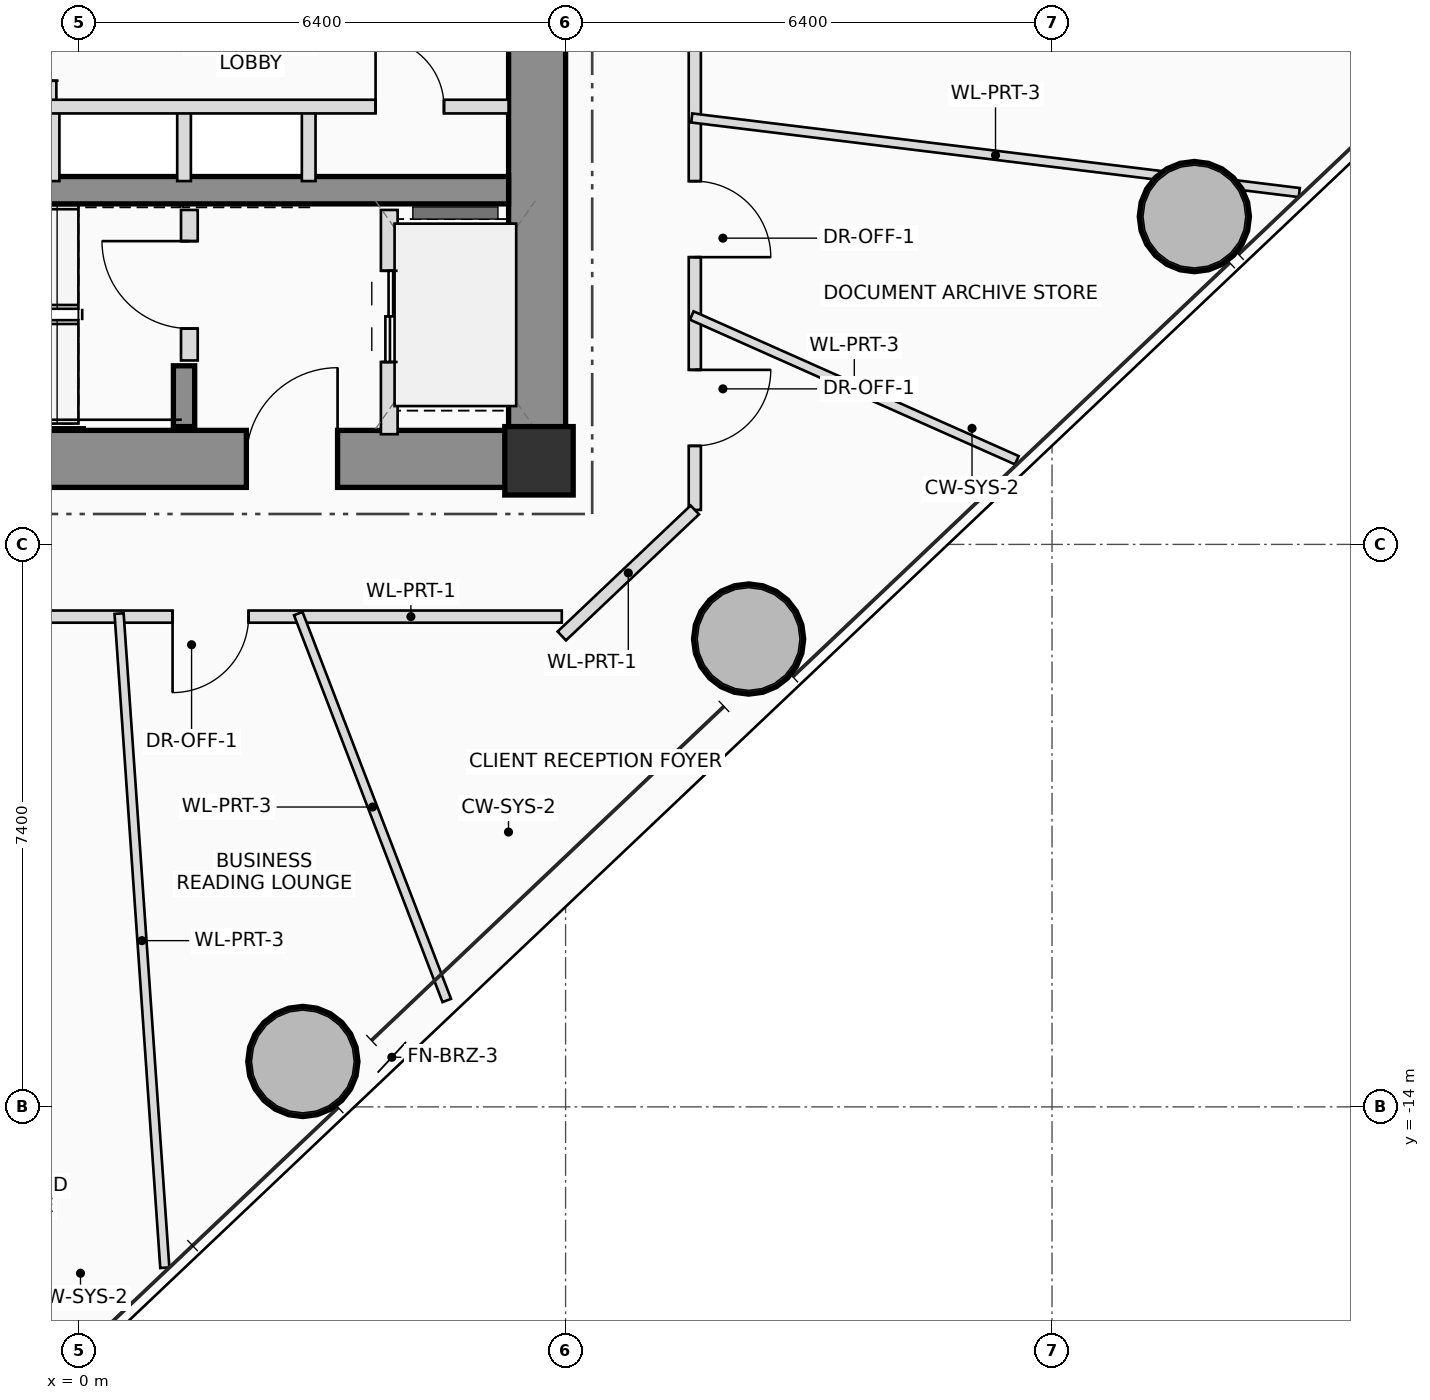
"""IFC4 building model, lengths in metres.
Left out: names, types, materials, properties, quantities, classifications, styles, units other than length and angle.
Written with IfcOpenShell. Run it as: python <this file> out.ifc"""

import sys

from ifc_helpers import new_model, si_unit, direction, frame, frame_2d, origin, origin_2d, place, context, subcontext, project, spatial, rectangle, hollow_circle, extrude, source, transform, mapped, element, fill, save


model = new_model("IFC4")
c1 = context("Model", 3, precision=1e-05, world=origin(), true_north=direction((0.0, 1.0)))
c2 = subcontext(c1, "Body", "Model", "MODEL_VIEW")
j1 = project(units=[si_unit("LENGTHUNIT", "METRE"), si_unit("PLANEANGLEUNIT", "RADIAN")], contexts=[c1])
p1 = place(None, origin())
s1 = spatial("IfcSite", under=j1, at=p1, CompositionType="ELEMENT")
p2 = place(p1, origin())
s2 = spatial("IfcBuilding", under=s1, at=p2, CompositionType="ELEMENT")
p3 = place(p2, frame((0.0, 0.0, 101.15)))
s3 = spatial("IfcBuildingStorey", under=s2, at=p3, CompositionType="ELEMENT", Elevation=101.15)
m1 = source(origin(), c2, "Body", "SweptSolid", [
    extrude(rectangle(XDim=0.9, YDim=0.9, at=origin_2d()), origin(), (0.0, 0.0, 1.0), 3.75),
])
p4 = place(p3, frame((6.05, -5.5, 0.0), z_axis=(0.0, 0.0, 1.0), x_axis=(1.0, 0.0, 0.0)))
e1 = element("IfcColumn", 1, at=p4, inside=s3, PredefinedType="COLUMN", context=c2, shape_type="MappedRepresentation", body=[
    mapped(m1, transform((0.0, 0.0, 0.0), scale=1.0)),
])
p5 = place(p3, frame((-6.4, -5.475, 0.0), z_axis=(0.0, 0.0, 1.0), x_axis=(1.0, 0.0, 0.0)))
e2 = element("IfcWall", 2, at=p5, inside=s3, PredefinedType="SHEAR", context=c2, shape_type="SweptSolid", body=[
    extrude(rectangle(XDim=12.8, YDim=0.75, at=frame_2d((6.4, 0.0))), origin(), (0.0, 0.0, 1.0), 3.75),
])
p6 = place(p5, frame((8.6, 0.0, 0.0)))
e3 = element("IfcOpeningElement", 3, at=p6, cuts=e2, PredefinedType="OPENING", context=c2, shape_type="SweptSolid", body=[
    extrude(rectangle(XDim=1.2, YDim=2.2, at=frame_2d((0.6, 1.1))), frame((0.0, 0.385, 0.0), z_axis=(0.0, -1.0, 0.0), x_axis=(1.0, 0.0, 0.0)), (0.0, 0.0, 1.0), 0.77),
])
p7 = place(p3, frame((6.025, -5.1, 0.0), z_axis=(0.0, 0.0, 1.0), x_axis=(0.0, 1.0, 0.0)))
e4 = element("IfcWall", 4, at=p7, inside=s3, PredefinedType="SHEAR", context=c2, shape_type="SweptSolid", body=[
    extrude(rectangle(XDim=10.2, YDim=0.75, at=frame_2d((5.1, 0.0))), origin(), (0.0, 0.0, 1.0), 3.75),
])
p8 = place(p3, frame((-5.65, -1.94, 0.0), z_axis=(0.0, 0.0, 1.0), x_axis=(1.0, 0.0, 0.0)))
e5 = element("IfcWall", 5, at=p8, inside=s3, PredefinedType="SHEAR", context=c2, shape_type="SweptSolid", body=[
    extrude(rectangle(XDim=11.3, YDim=0.36, at=frame_2d((5.65, 0.0))), origin(), (0.0, 0.0, 1.0), 3.75),
])
p9 = place(p3, frame((1.38, -5.05, 0.0), z_axis=(0.0, 0.0, 1.0), x_axis=(0.0, 1.0, 0.0)))
e6 = element("IfcWall", 6, at=p9, inside=s3, PredefinedType="SHEAR", context=c2, shape_type="SweptSolid", body=[
    extrude(rectangle(XDim=0.8, YDim=0.28, at=frame_2d((0.4, 0.0))), origin(), (0.0, 0.0, 1.0), 3.75),
])
m2 = source(origin(), c2, "Body", "SweptSolid", [
    extrude(hollow_circle(Radius=0.725, WallThickness=0.05, at=origin_2d()), origin(), (0.0, 0.0, 1.0), 3.75),
])
for number, where, z_axis, x_axis in (
    (7, (2.943, -13.402, 0.0), (0.0, 0.0, 1.0), (1.0, 0.0, 0.0)),
    (8, (8.808, -7.845, 0.0), (0.0, 0.0, 1.0), (1.0, 0.0, 0.0)),
    (9, (14.673, -2.287, 0.0), (0.0, 0.0, 1.0), (1.0, 0.0, 0.0)),
):
    element("IfcColumn", number, at=place(p3, frame(where, z_axis=z_axis, x_axis=x_axis)), inside=s3, PredefinedType="COLUMN", context=c2, shape_type="MappedRepresentation", body=[
        mapped(m2, transform((0.0, 0.0, 0.0), scale=1.0)),
    ])
p10 = place(p3, frame((1.45, -4.18, 0.0), z_axis=(0.0, 0.0, 1.0), x_axis=(0.0, 1.0, 0.0)))
e10 = element("IfcWall", 10, at=p10, inside=s3, PredefinedType="PLUMBINGWALL", context=c2, shape_type="SweptSolid", body=[
    extrude(rectangle(XDim=1.98, YDim=0.22, at=frame_2d((0.99, 0.0))), origin(), (0.0, 0.0, 1.0), 3.545),
])
p11 = place(p10, frame((0.42, 0.0, 0.0)))
e11 = element("IfcOpeningElement", 11, at=p11, cuts=e10, PredefinedType="OPENING", context=c2, shape_type="SweptSolid", body=[
    extrude(rectangle(XDim=1.15, YDim=2.15, at=frame_2d((0.575, 1.075))), frame((0.0, 0.12, 0.0), z_axis=(0.0, -1.0, 0.0), x_axis=(1.0, 0.0, 0.0)), (0.0, 0.0, 1.0), 0.24),
])
p12 = place(p3, frame((4.08, -5.15, 0.0), z_axis=(0.0, 0.0, 1.0), x_axis=(0.0, 1.0, 0.0)))
e12 = element("IfcWall", 12, at=p12, inside=s3, PredefinedType="PLUMBINGWALL", context=c2, shape_type="SweptSolid", body=[
    extrude(rectangle(XDim=2.95, YDim=0.22, at=frame_2d((1.475, 0.0))), origin(), (0.0, 0.0, 1.0), 3.545),
])
p13 = place(p12, frame((0.95, 0.0, 0.0)))
e13 = element("IfcOpeningElement", 13, at=p13, cuts=e12, PredefinedType="OPENING", context=c2, shape_type="SweptSolid", body=[
    extrude(rectangle(XDim=1.2, YDim=2.25, at=frame_2d((0.6, 1.125))), frame((0.0, 0.12, 0.0), z_axis=(0.0, -1.0, 0.0), x_axis=(1.0, 0.0, 0.0)), (0.0, 0.0, 1.0), 0.24),
])
p14 = place(p3, frame((-0.35, -0.84, 0.0), z_axis=(0.0, 0.0, 1.0), x_axis=(0.0, 1.0, 0.0)))
e14 = element("IfcWall", 14, at=p14, inside=s3, PredefinedType="PARTITIONING", context=c2, shape_type="SweptSolid", body=[
    extrude(rectangle(XDim=1.68, YDim=0.1, at=frame_2d((0.84, 0.0))), origin(), (0.0, 0.0, 1.0), 3.545),
])
p15 = place(p14, frame((0.34, 0.0, 0.0)))
e15 = element("IfcOpeningElement", 15, at=p15, cuts=e14, PredefinedType="OPENING", context=c2, shape_type="SweptSolid", body=[
    extrude(rectangle(XDim=1.0, YDim=2.25, at=frame_2d((0.5, 1.125))), frame((0.0, 0.06, 0.0), z_axis=(0.0, -1.0, 0.0), x_axis=(1.0, 0.0, 0.0)), (0.0, 0.0, 1.0), 0.12),
])
for number, where, z_axis, x_axis in (
    (16, (-0.35, -1.82, 0.0), (0.0, 0.0, 1.0), (0.0, 1.0, 0.0)),
    (17, (1.38, -1.82, 0.0), (0.0, 0.0, 1.0), (0.0, 1.0, 0.0)),
    (18, (3.02, -1.82, 0.0), (0.0, 0.0, 1.0), (0.0, 1.0, 0.0)),
):
    element("IfcWall", number, at=place(p3, frame(where, z_axis=z_axis, x_axis=x_axis)), inside=s3, PredefinedType="PLUMBINGWALL", context=c2, shape_type="SweptSolid", body=[
        extrude(rectangle(XDim=0.98, YDim=0.18, at=frame_2d((0.49, 0.0))), origin(), (0.0, 0.0, 1.0), 3.545),
    ])
p16 = place(p3, frame((-5.68, -0.84, 0.0), z_axis=(0.0, 0.0, 1.0), x_axis=(1.0, 0.0, 0.0)))
e19 = element("IfcWall", 19, at=p16, inside=s3, PredefinedType="PLUMBINGWALL", context=c2, shape_type="SweptSolid", body=[
    extrude(rectangle(XDim=11.33, YDim=0.18, at=frame_2d((5.665, 0.0))), origin(), (0.0, 0.0, 1.0), 3.545),
])
p17 = place(p16, frame((0.43, 0.0, 0.0)))
e20 = element("IfcOpeningElement", 20, at=p17, cuts=e19, PredefinedType="OPENING", context=c2, shape_type="SweptSolid", body=[
    extrude(rectangle(XDim=1.1, YDim=2.2, at=frame_2d((0.55, 1.1))), frame((0.0, 0.1, 0.0), z_axis=(0.0, -1.0, 0.0), x_axis=(1.0, 0.0, 0.0)), (0.0, 0.0, 1.0), 0.2),
])
p18 = place(p16, frame((2.13, 0.0, 0.0)))
e21 = element("IfcOpeningElement", 21, at=p18, cuts=e19, PredefinedType="OPENING", context=c2, shape_type="SweptSolid", body=[
    extrude(rectangle(XDim=1.1, YDim=2.2, at=frame_2d((0.55, 1.1))), frame((0.0, 0.1, 0.0), z_axis=(0.0, -1.0, 0.0), x_axis=(1.0, 0.0, 0.0)), (0.0, 0.0, 1.0), 0.2),
])
p19 = place(p16, frame((9.58, 0.0, 0.0)))
e22 = element("IfcOpeningElement", 22, at=p19, cuts=e19, PredefinedType="OPENING", context=c2, shape_type="SweptSolid", body=[
    extrude(rectangle(XDim=0.9, YDim=2.05, at=frame_2d((0.45, 1.025))), frame((0.0, 0.1, 0.0), z_axis=(0.0, -1.0, 0.0), x_axis=(1.0, 0.0, 0.0)), (0.0, 0.0, 1.0), 0.2),
])
p20 = place(p3, frame((8.1, -0.02, 0.0), z_axis=(0.0, 0.0, 1.0), x_axis=(0.0, -1.0, 0.0)))
e23 = element("IfcWall", 23, at=p20, inside=s3, PredefinedType="PARTITIONING", context=c2, shape_type="SweptSolid", body=[
    extrude(rectangle(XDim=6.126, YDim=0.16, at=frame_2d((3.063, 0.0))), origin(), (0.0, 0.0, 1.0), 2.85),
])
p21 = place(p20, frame((1.801, 0.0, 0.0)))
e24 = element("IfcOpeningElement", 24, at=p21, cuts=e23, PredefinedType="OPENING", context=c2, shape_type="SweptSolid", body=[
    extrude(rectangle(XDim=1.0, YDim=2.25, at=frame_2d((0.5, 1.125))), frame((0.0, 0.09, 0.0), z_axis=(0.0, -1.0, 0.0), x_axis=(1.0, 0.0, 0.0)), (0.0, 0.0, 1.0), 0.18),
])
p22 = place(p20, frame((4.284, 0.0, 0.0)))
e25 = element("IfcOpeningElement", 25, at=p22, cuts=e23, PredefinedType="OPENING", context=c2, shape_type="SweptSolid", body=[
    extrude(rectangle(XDim=1.0, YDim=2.25, at=frame_2d((0.5, 1.125))), frame((0.0, 0.09, 0.0), z_axis=(0.0, -1.0, 0.0), x_axis=(1.0, 0.0, 0.0)), (0.0, 0.0, 1.0), 0.18),
])
p23 = place(p3, frame((8.1, -6.146, 0.0), z_axis=(0.0, 0.0, 1.0), x_axis=(-0.725888815428, -0.687812058368, 0.0)))
e26 = element("IfcWall", 26, at=p23, inside=s3, PredefinedType="PARTITIONING", context=c2, shape_type="SweptSolid", body=[
    extrude(rectangle(XDim=2.411, YDim=0.16, at=frame_2d((1.206, 0.0))), origin(), (0.0, 0.0, 1.0), 2.85),
])
p24 = place(p3, frame((6.35, -7.55, 0.0), z_axis=(0.0, 0.0, 1.0), x_axis=(-1.0, 0.0, 0.0)))
e27 = element("IfcWall", 27, at=p24, inside=s3, PredefinedType="PARTITIONING", context=c2, shape_type="SweptSolid", body=[
    extrude(rectangle(XDim=12.7, YDim=0.16, at=frame_2d((6.35, 0.0))), origin(), (0.0, 0.0, 1.0), 2.85),
])
p25 = place(p24, frame((4.121, 0.0, 0.0)))
e28 = element("IfcOpeningElement", 28, at=p25, cuts=e27, PredefinedType="OPENING", context=c2, shape_type="SweptSolid", body=[
    extrude(rectangle(XDim=1.0, YDim=2.25, at=frame_2d((0.5, 1.125))), frame((0.0, 0.09, 0.0), z_axis=(0.0, -1.0, 0.0), x_axis=(1.0, 0.0, 0.0)), (0.0, 0.0, 1.0), 0.18),
])
p26 = place(p24, frame((7.966, 0.0, 0.0)))
e29 = element("IfcOpeningElement", 29, at=p26, cuts=e27, PredefinedType="OPENING", context=c2, shape_type="SweptSolid", body=[
    extrude(rectangle(XDim=1.0, YDim=2.25, at=frame_2d((0.5, 1.125))), frame((0.0, 0.09, 0.0), z_axis=(0.0, -1.0, 0.0), x_axis=(1.0, 0.0, 0.0)), (0.0, 0.0, 1.0), 0.18),
])
p27 = place(p3, frame((0.525, -7.51, 0.0), z_axis=(0.0, 0.0, 1.0), x_axis=(0.069760692691, -0.997563755233, 0.0)))
e30 = element("IfcWall", 30, at=p27, inside=s3, PredefinedType="PARTITIONING", context=c2, shape_type="SweptSolid", body=[
    extrude(rectangle(XDim=8.627, YDim=0.12, at=frame_2d((4.313, 0.0))), origin(), (0.0, 0.0, 1.0), 3.01),
])
p28 = place(p3, frame((2.883, -7.51, 0.0), z_axis=(0.0, 0.0, 1.0), x_axis=(0.35836087515, -0.933583142072, 0.0)))
e31 = element("IfcWall", 31, at=p28, inside=s3, PredefinedType="PARTITIONING", context=c2, shape_type="SweptSolid", body=[
    extrude(rectangle(XDim=5.452, YDim=0.12, at=frame_2d((2.726, 0.0))), origin(), (0.0, 0.0, 1.0), 2.85),
])
p29 = place(p3, frame((8.06, -3.588, 0.0), z_axis=(0.0, 0.0, 1.0), x_axis=(0.913536081089, -0.406757702506, 0.0)))
e32 = element("IfcWall", 32, at=p29, inside=s3, PredefinedType="PARTITIONING", context=c2, shape_type="SweptSolid", body=[
    extrude(rectangle(XDim=4.682, YDim=0.12, at=frame_2d((2.341, 0.0))), origin(), (0.0, 0.0, 1.0), 2.85),
])
p30 = place(p3, frame((8.06, -0.99, 0.0), z_axis=(0.0, 0.0, 1.0), x_axis=(0.99254191086, -0.121903876831, 0.0)))
e33 = element("IfcWall", 33, at=p30, inside=s3, PredefinedType="PARTITIONING", context=c2, shape_type="SweptSolid", body=[
    extrude(rectangle(XDim=8.053, YDim=0.12, at=frame_2d((4.026, 0.0))), origin(), (0.0, 0.0, 1.0), 2.85),
])
p31 = place(p6, origin())
e34 = element("IfcDoor", 34, at=p31, inside=s3, OperationType="SINGLE_SWING_RIGHT", PredefinedType="DOOR", context=c2, shape_type="SweptSolid", body=[
    extrude(rectangle(XDim=1.2, YDim=2.2, at=frame_2d((0.6, 1.1))), frame((0.0, 0.025, 0.0), z_axis=(0.0, -1.0, 0.0), x_axis=(1.0, 0.0, 0.0)), (0.0, 0.0, 1.0), 0.05),
])
fill(e3, e34)
p32 = place(p11, origin())
e35 = element("IfcDoor", 35, at=p32, inside=s3, OperationType="SINGLE_SWING_RIGHT", PredefinedType="DOOR", context=c2, shape_type="SweptSolid", body=[
    extrude(rectangle(XDim=1.15, YDim=2.15, at=frame_2d((0.575, 1.075))), frame((0.0, 0.025, 0.0), z_axis=(0.0, -1.0, 0.0), x_axis=(1.0, 0.0, 0.0)), (0.0, 0.0, 1.0), 0.05),
])
fill(e11, e35)
p33 = place(p13, origin())
e36 = element("IfcDoor", 36, at=p33, inside=s3, OperationType="DOUBLE_DOOR_SLIDING", PredefinedType="DOOR", context=c2, shape_type="SweptSolid", body=[
    extrude(rectangle(XDim=1.2, YDim=2.25, at=frame_2d((0.6, 1.125))), frame((0.0, 0.025, 0.0), z_axis=(0.0, -1.0, 0.0), x_axis=(1.0, 0.0, 0.0)), (0.0, 0.0, 1.0), 0.05),
])
fill(e13, e36)
p34 = place(p15, origin())
e37 = element("IfcDoor", 37, at=p34, inside=s3, OperationType="SINGLE_SWING_LEFT", PredefinedType="DOOR", context=c2, shape_type="SweptSolid", body=[
    extrude(rectangle(XDim=1.0, YDim=2.25, at=frame_2d((0.5, 1.125))), frame((0.0, 0.025, 0.0), z_axis=(0.0, -1.0, 0.0), x_axis=(1.0, 0.0, 0.0)), (0.0, 0.0, 1.0), 0.05),
])
fill(e15, e37)
p35 = place(p19, origin())
e38 = element("IfcDoor", 38, at=p35, inside=s3, OperationType="SINGLE_SWING_LEFT", PredefinedType="DOOR", context=c2, shape_type="SweptSolid", body=[
    extrude(rectangle(XDim=0.9, YDim=2.05, at=frame_2d((0.45, 1.025))), frame((0.0, 0.025, 0.0), z_axis=(0.0, -1.0, 0.0), x_axis=(1.0, 0.0, 0.0)), (0.0, 0.0, 1.0), 0.05),
])
fill(e22, e38)
p36 = place(p21, origin())
e39 = element("IfcDoor", 39, at=p36, inside=s3, OperationType="SINGLE_SWING_RIGHT", PredefinedType="DOOR", context=c2, shape_type="SweptSolid", body=[
    extrude(rectangle(XDim=1.0, YDim=2.25, at=frame_2d((0.5, 1.125))), frame((0.0, 0.025, 0.0), z_axis=(0.0, -1.0, 0.0), x_axis=(1.0, 0.0, 0.0)), (0.0, 0.0, 1.0), 0.05),
])
fill(e24, e39)
p37 = place(p22, origin())
e40 = element("IfcDoor", 40, at=p37, inside=s3, OperationType="SINGLE_SWING_LEFT", PredefinedType="DOOR", context=c2, shape_type="SweptSolid", body=[
    extrude(rectangle(XDim=1.0, YDim=2.25, at=frame_2d((0.5, 1.125))), frame((0.0, 0.025, 0.0), z_axis=(0.0, -1.0, 0.0), x_axis=(1.0, 0.0, 0.0)), (0.0, 0.0, 1.0), 0.05),
])
fill(e25, e40)
p38 = place(p25, origin())
e41 = element("IfcDoor", 41, at=p38, inside=s3, OperationType="SINGLE_SWING_RIGHT", PredefinedType="DOOR", context=c2, shape_type="SweptSolid", body=[
    extrude(rectangle(XDim=1.0, YDim=2.25, at=frame_2d((0.5, 1.125))), frame((0.0, 0.025, 0.0), z_axis=(0.0, -1.0, 0.0), x_axis=(1.0, 0.0, 0.0)), (0.0, 0.0, 1.0), 0.05),
])
fill(e28, e41)
save(model, sys.argv[1])
